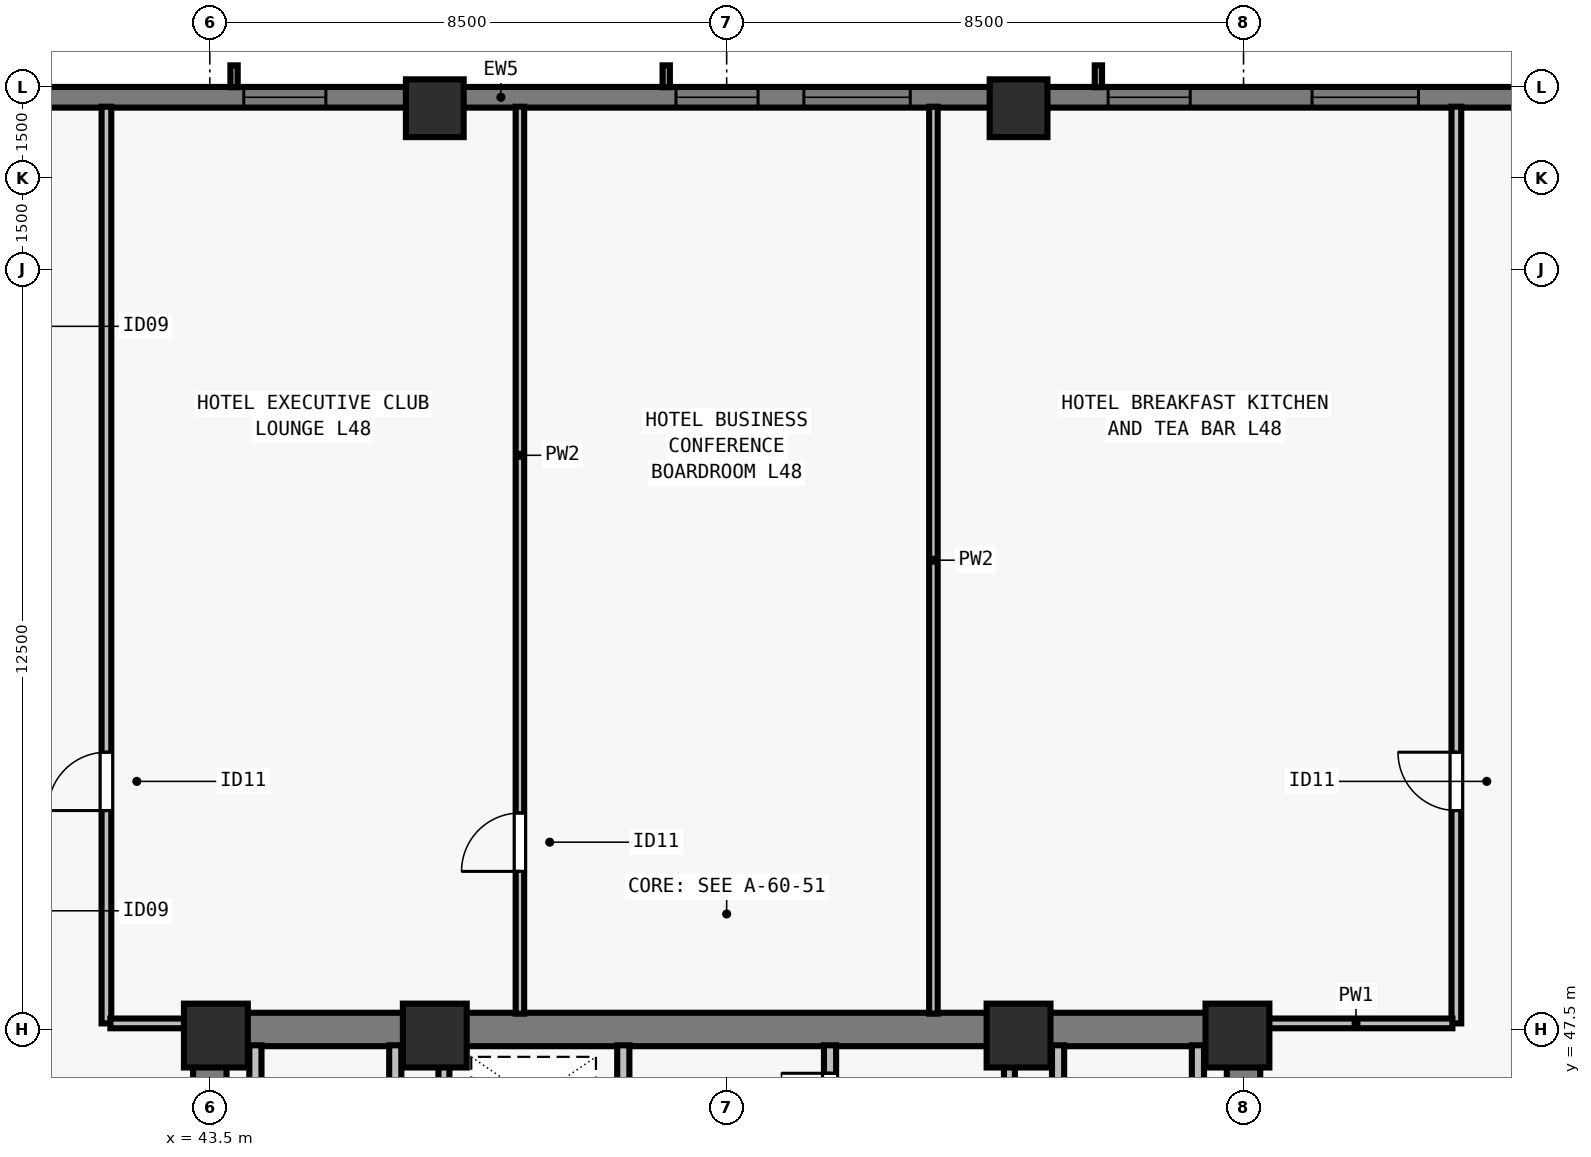
"""IFC4 building model, lengths in metres.
Left out: names, types, materials, properties, quantities, classifications, styles, units other than length and angle.
Written with IfcOpenShell. Run it as: python <this file> out.ifc"""

import sys

from ifc_helpers import new_model, si_unit, direction, frame, frame_2d, origin, origin_2d, place, context, subcontext, project, spatial, rectangle, extrude, element, fill, save


model = new_model("IFC4")
c1 = context("Model", 3, precision=1e-05, world=origin(), true_north=direction((0.0, 1.0)))
c2 = subcontext(c1, "Body", "Model", "MODEL_VIEW")
j1 = project(units=[si_unit("LENGTHUNIT", "METRE"), si_unit("PLANEANGLEUNIT", "RADIAN")], contexts=[c1])
p1 = place(None, origin())
s1 = spatial("IfcSite", under=j1, at=p1, CompositionType="ELEMENT")
p2 = place(p1, origin())
s2 = spatial("IfcBuilding", under=s1, at=p2, CompositionType="ELEMENT")
p3 = place(p2, frame((0.0, 0.0, 176.0)))
s3 = spatial("IfcBuildingStorey", under=s2, at=p3, CompositionType="ELEMENT", Elevation=176.0)
for number, where, z_axis, x_axis in (
    (1, (43.6, 47.4, 0.0), (0.0, 0.0, 1.0), (1.0, 0.0, 0.0)),
    (2, (47.2, 47.4, 0.0), (0.0, 0.0, 1.0), (1.0, 0.0, 0.0)),
    (3, (56.8, 47.4, 0.0), (0.0, 0.0, 1.0), (1.0, 0.0, 0.0)),
    (4, (60.4, 47.4, 0.0), (0.0, 0.0, 1.0), (1.0, 0.0, 0.0)),
):
    element("IfcColumn", number, at=place(p3, frame(where, z_axis=z_axis, x_axis=x_axis)), inside=s3, PredefinedType="COLUMN", context=c2, shape_type="SweptSolid", body=[
        extrude(rectangle(XDim=1.05, YDim=1.05, at=origin_2d()), origin(), (0.0, 0.0, 1.0), 3.5),
    ])
for number, where, z_axis, x_axis in (
    (5, (56.8, 62.65, 0.0), (0.0, 0.0, 1.0), (1.0, 0.0, 0.0)),
    (6, (47.2, 62.65, 0.0), (0.0, 0.0, 1.0), (1.0, 0.0, 0.0)),
):
    element("IfcColumn", number, at=place(p3, frame(where, z_axis=z_axis, x_axis=x_axis)), inside=s3, PredefinedType="COLUMN", context=c2, shape_type="SweptSolid", body=[
        extrude(rectangle(XDim=0.95, YDim=0.95, at=origin_2d()), origin(), (0.0, 0.0, 1.0), 3.5),
    ])
p4 = place(p3, frame((32.0, 62.83, 0.0), z_axis=(0.0, 0.0, 1.0), x_axis=(1.0, 0.0, 0.0)))
e7 = element("IfcWall", 7, at=p4, inside=s3, PredefinedType="SOLIDWALL", context=c2, shape_type="SweptSolid", body=[
    extrude(rectangle(XDim=39.682, YDim=0.34, at=frame_2d((19.841, 0.0))), origin(), (0.0, 0.0, 1.0), 3.28),
])
p5 = place(p4, frame((4.952, 0.0, 0.8)))
e8 = element("IfcOpeningElement", 8, at=p5, cuts=e7, PredefinedType="OPENING", context=c2, shape_type="SweptSolid", body=[
    extrude(rectangle(XDim=1.35, YDim=1.66, at=frame_2d((0.675, 0.83))), frame((0.0, 0.18, 0.0), z_axis=(0.0, -1.0, 0.0), x_axis=(1.0, 0.0, 0.0)), (0.0, 0.0, 1.0), 0.36),
])
p6 = place(p4, frame((12.059, 0.0, 0.8)))
e9 = element("IfcOpeningElement", 9, at=p6, cuts=e7, PredefinedType="OPENING", context=c2, shape_type="SweptSolid", body=[
    extrude(rectangle(XDim=1.35, YDim=1.66, at=frame_2d((0.675, 0.83))), frame((0.0, 0.18, 0.0), z_axis=(0.0, -1.0, 0.0), x_axis=(1.0, 0.0, 0.0)), (0.0, 0.0, 1.0), 0.36),
])
p7 = place(p4, frame((19.166, 0.0, 0.8)))
e10 = element("IfcOpeningElement", 10, at=p7, cuts=e7, PredefinedType="OPENING", context=c2, shape_type="SweptSolid", body=[
    extrude(rectangle(XDim=1.35, YDim=1.66, at=frame_2d((0.675, 0.83))), frame((0.0, 0.18, 0.0), z_axis=(0.0, -1.0, 0.0), x_axis=(1.0, 0.0, 0.0)), (0.0, 0.0, 1.0), 0.36),
])
p8 = place(p4, frame((21.27, 0.0, 0.8)))
e11 = element("IfcOpeningElement", 11, at=p8, cuts=e7, PredefinedType="OPENING", context=c2, shape_type="SweptSolid", body=[
    extrude(rectangle(XDim=1.75, YDim=1.66, at=frame_2d((0.875, 0.83))), frame((0.0, 0.18, 0.0), z_axis=(0.0, -1.0, 0.0), x_axis=(1.0, 0.0, 0.0)), (0.0, 0.0, 1.0), 0.36),
])
p9 = place(p4, frame((26.273, 0.0, 0.8)))
e12 = element("IfcOpeningElement", 12, at=p9, cuts=e7, PredefinedType="OPENING", context=c2, shape_type="SweptSolid", body=[
    extrude(rectangle(XDim=1.35, YDim=1.66, at=frame_2d((0.675, 0.83))), frame((0.0, 0.18, 0.0), z_axis=(0.0, -1.0, 0.0), x_axis=(1.0, 0.0, 0.0)), (0.0, 0.0, 1.0), 0.36),
])
p10 = place(p4, frame((29.627, 0.0, 0.8)))
e13 = element("IfcOpeningElement", 13, at=p10, cuts=e7, PredefinedType="OPENING", context=c2, shape_type="SweptSolid", body=[
    extrude(rectangle(XDim=1.75, YDim=1.66, at=frame_2d((0.875, 0.83))), frame((0.0, 0.18, 0.0), z_axis=(0.0, -1.0, 0.0), x_axis=(1.0, 0.0, 0.0)), (0.0, 0.0, 1.0), 0.36),
])
p11 = place(p4, frame((34.47, 0.0, 0.8)))
e14 = element("IfcOpeningElement", 14, at=p11, cuts=e7, PredefinedType="OPENING", context=c2, shape_type="SweptSolid", body=[
    extrude(rectangle(XDim=0.9, YDim=1.66, at=frame_2d((0.45, 0.83))), frame((0.0, 0.18, 0.0), z_axis=(0.0, -1.0, 0.0), x_axis=(1.0, 0.0, 0.0)), (0.0, 0.0, 1.0), 0.36),
])
p12 = place(p3, frame((43.225, 47.5, 0.0), z_axis=(0.0, 0.0, 1.0), x_axis=(1.0, 0.0, 0.0)))
e15 = element("IfcWall", 15, at=p12, inside=s3, PredefinedType="SHEAR", context=c2, shape_type="SweptSolid", body=[
    extrude(rectangle(XDim=17.55, YDim=0.55, at=frame_2d((8.775, 0.0))), origin(), (0.0, 0.0, 1.0), 3.28),
])
for number, where, z_axis, x_axis in (
    (16, (43.5, 40.8, 0.0), (0.0, 0.0, 1.0), (0.0, 1.0, 0.0)),
    (17, (60.5, 40.8, 0.0), (0.0, 0.0, 1.0), (0.0, 1.0, 0.0)),
):
    element("IfcWall", number, at=place(p3, frame(where, z_axis=z_axis, x_axis=x_axis)), inside=s3, PredefinedType="SHEAR", context=c2, shape_type="SweptSolid", body=[
        extrude(rectangle(XDim=6.435, YDim=0.55, at=frame_2d((3.218, 0.0))), origin(), (0.0, 0.0, 1.0), 3.28),
    ])
p13 = place(p3, frame((50.3, 40.585, 0.0), z_axis=(0.0, 0.0, 1.0), x_axis=(0.0, 1.0, 0.0)))
e18 = element("IfcWall", 18, at=p13, inside=s3, PredefinedType="SOLIDWALL", context=c2, shape_type="SweptSolid", body=[
    extrude(rectangle(XDim=6.655, YDim=0.2, at=frame_2d((3.328, 0.0))), origin(), (0.0, 0.0, 1.0), 3.28),
])
p14 = place(p13, frame((5.065, 0.0, 0.0)))
e19 = element("IfcOpeningElement", 19, at=p14, cuts=e18, PredefinedType="OPENING", context=c2, shape_type="SweptSolid", body=[
    extrude(rectangle(XDim=0.8, YDim=2.08, at=frame_2d((0.4, 1.04))), frame((0.0, 0.11, 0.0), z_axis=(0.0, -1.0, 0.0), x_axis=(1.0, 0.0, 0.0)), (0.0, 0.0, 1.0), 0.22),
])
p15 = place(p3, frame((53.7, 40.585, 0.0), z_axis=(0.0, 0.0, 1.0), x_axis=(0.0, 1.0, 0.0)))
e20 = element("IfcWall", 20, at=p15, inside=s3, PredefinedType="SOLIDWALL", context=c2, shape_type="SweptSolid", body=[
    extrude(rectangle(XDim=6.655, YDim=0.2, at=frame_2d((3.328, 0.0))), origin(), (0.0, 0.0, 1.0), 3.28),
])
p16 = place(p15, frame((0.195, 0.0, 0.0)))
e21 = element("IfcOpeningElement", 21, at=p16, cuts=e20, PredefinedType="OPENING", context=c2, shape_type="SweptSolid", body=[
    extrude(rectangle(XDim=0.8, YDim=2.08, at=frame_2d((0.4, 1.04))), frame((0.0, 0.11, 0.0), z_axis=(0.0, -1.0, 0.0), x_axis=(1.0, 0.0, 0.0)), (0.0, 0.0, 1.0), 0.22),
])
p17 = place(p15, frame((3.735, 0.0, 0.0)))
e22 = element("IfcOpeningElement", 22, at=p17, cuts=e20, PredefinedType="OPENING", context=c2, shape_type="SweptSolid", body=[
    extrude(rectangle(XDim=0.9, YDim=2.12, at=frame_2d((0.45, 1.06))), frame((0.0, 0.11, 0.0), z_axis=(0.0, -1.0, 0.0), x_axis=(1.0, 0.0, 0.0)), (0.0, 0.0, 1.0), 0.22),
])
p18 = place(p15, frame((5.395, 0.0, 0.0)))
e23 = element("IfcOpeningElement", 23, at=p18, cuts=e20, PredefinedType="OPENING", context=c2, shape_type="SweptSolid", body=[
    extrude(rectangle(XDim=0.8, YDim=2.1, at=frame_2d((0.4, 1.05))), frame((0.0, 0.11, 0.0), z_axis=(0.0, -1.0, 0.0), x_axis=(1.0, 0.0, 0.0)), (0.0, 0.0, 1.0), 0.22),
])
for number, where, z_axis, x_axis in (
    (24, (46.55, 43.735, 0.0), (0.0, 0.0, 1.0), (0.0, 1.0, 0.0)),
    (25, (44.25, 43.735, 0.0), (0.0, 0.0, 1.0), (0.0, 1.0, 0.0)),
    (26, (57.45, 43.735, 0.0), (0.0, 0.0, 1.0), (0.0, 1.0, 0.0)),
    (27, (59.75, 43.735, 0.0), (0.0, 0.0, 1.0), (0.0, 1.0, 0.0)),
):
    element("IfcWall", number, at=place(p3, frame(where, z_axis=z_axis, x_axis=x_axis)), inside=s3, PredefinedType="SOLIDWALL", context=c2, shape_type="SweptSolid", body=[
        extrude(rectangle(XDim=3.505, YDim=0.2, at=frame_2d((1.752, 0.0))), origin(), (0.0, 0.0, 1.0), 3.28),
    ])
for number, where, z_axis, x_axis in (
    (28, (47.35, 43.735, 0.0), (0.0, 0.0, 1.0), (0.0, 1.0, 0.0)),
    (29, (56.65, 43.735, 0.0), (0.0, 0.0, 1.0), (0.0, 1.0, 0.0)),
):
    element("IfcWall", number, at=place(p3, frame(where, z_axis=z_axis, x_axis=x_axis)), inside=s3, PredefinedType="SOLIDWALL", context=c2, shape_type="SweptSolid", body=[
        extrude(rectangle(XDim=3.505, YDim=0.18, at=frame_2d((1.752, 0.0))), origin(), (0.0, 0.0, 1.0), 3.28),
    ])
p19 = place(p3, frame((41.8, 47.6, 0.0), z_axis=(0.0, 0.0, 1.0), x_axis=(0.0, 1.0, 0.0)))
e30 = element("IfcWall", 30, at=p19, inside=s3, PredefinedType="PARTITIONING", context=c2, shape_type="SweptSolid", body=[
    extrude(rectangle(XDim=15.075, YDim=0.16, at=frame_2d((7.538, 0.0))), origin(), (0.0, 0.0, 1.0), 2.555),
])
p20 = place(p19, frame((3.5, 0.0, 0.0)))
e31 = element("IfcOpeningElement", 31, at=p20, cuts=e30, PredefinedType="OPENING", context=c2, shape_type="SweptSolid", body=[
    extrude(rectangle(XDim=0.96, YDim=2.12, at=frame_2d((0.48, 1.06))), frame((0.0, 0.09, 0.0), z_axis=(0.0, -1.0, 0.0), x_axis=(1.0, 0.0, 0.0)), (0.0, 0.0, 1.0), 0.18),
])
p21 = place(p3, frame((41.865, 47.6, 0.0), z_axis=(0.0, 0.0, 1.0), x_axis=(1.0, 0.0, 0.0)))
e32 = element("IfcWall", 32, at=p21, inside=s3, PredefinedType="PARTITIONING", context=c2, shape_type="SweptSolid", body=[
    extrude(rectangle(XDim=1.37, YDim=0.16, at=frame_2d((0.685, 0.0))), origin(), (0.0, 0.0, 1.0), 3.28),
])
p22 = place(p3, frame((64.0, 47.6, 0.0), z_axis=(0.0, 0.0, 1.0), x_axis=(0.0, 1.0, 0.0)))
e33 = element("IfcWall", 33, at=p22, inside=s3, PredefinedType="PARTITIONING", context=c2, shape_type="SweptSolid", body=[
    extrude(rectangle(XDim=15.075, YDim=0.16, at=frame_2d((7.538, 0.0))), origin(), (0.0, 0.0, 1.0), 2.555),
])
p23 = place(p22, frame((3.5, 0.0, 0.0)))
e34 = element("IfcOpeningElement", 34, at=p23, cuts=e33, PredefinedType="OPENING", context=c2, shape_type="SweptSolid", body=[
    extrude(rectangle(XDim=0.96, YDim=2.12, at=frame_2d((0.48, 1.06))), frame((0.0, 0.09, 0.0), z_axis=(0.0, -1.0, 0.0), x_axis=(1.0, 0.0, 0.0)), (0.0, 0.0, 1.0), 0.18),
])
p24 = place(p3, frame((60.765, 47.6, 0.0), z_axis=(0.0, 0.0, 1.0), x_axis=(1.0, 0.0, 0.0)))
e35 = element("IfcWall", 35, at=p24, inside=s3, PredefinedType="PARTITIONING", context=c2, shape_type="SweptSolid", body=[
    extrude(rectangle(XDim=3.17, YDim=0.16, at=frame_2d((1.585, 0.0))), origin(), (0.0, 0.0, 1.0), 3.28),
])
p25 = place(p3, frame((48.6, 47.76, 0.0), z_axis=(0.0, 0.0, 1.0), x_axis=(0.0, 1.0, 0.0)))
e36 = element("IfcWall", 36, at=p25, inside=s3, PredefinedType="PARTITIONING", context=c2, shape_type="SweptSolid", body=[
    extrude(rectangle(XDim=14.915, YDim=0.14, at=frame_2d((7.458, 0.0))), origin(), (0.0, 0.0, 1.0), 2.896),
])
p26 = place(p25, frame((2.34, 0.0, 0.0)))
e37 = element("IfcOpeningElement", 37, at=p26, cuts=e36, PredefinedType="OPENING", context=c2, shape_type="SweptSolid", body=[
    extrude(rectangle(XDim=0.96, YDim=2.12, at=frame_2d((0.48, 1.06))), frame((0.0, 0.08, 0.0), z_axis=(0.0, -1.0, 0.0), x_axis=(1.0, 0.0, 0.0)), (0.0, 0.0, 1.0), 0.16),
])
p27 = place(p3, frame((55.4, 47.76, 0.0), z_axis=(0.0, 0.0, 1.0), x_axis=(0.0, 1.0, 0.0)))
e38 = element("IfcWall", 38, at=p27, inside=s3, PredefinedType="PARTITIONING", context=c2, shape_type="SweptSolid", body=[
    extrude(rectangle(XDim=14.915, YDim=0.14, at=frame_2d((7.458, 0.0))), origin(), (0.0, 0.0, 1.0), 2.896),
])
p28 = place(p6, origin())
e39 = element("IfcWindow", 39, at=p28, inside=s3, PartitioningType="SINGLE_PANEL", PredefinedType="WINDOW", context=c2, shape_type="SweptSolid", body=[
    extrude(rectangle(XDim=1.35, YDim=1.66, at=frame_2d((0.675, 0.83))), frame((0.0, -0.05, 0.0), z_axis=(0.0, -1.0, 0.0), x_axis=(1.0, 0.0, 0.0)), (0.0, 0.0, 1.0), 0.06),
])
fill(e9, e39)
p29 = place(p7, origin())
e40 = element("IfcWindow", 40, at=p29, inside=s3, PartitioningType="SINGLE_PANEL", PredefinedType="WINDOW", context=c2, shape_type="SweptSolid", body=[
    extrude(rectangle(XDim=1.35, YDim=1.66, at=frame_2d((0.675, 0.83))), frame((0.0, -0.05, 0.0), z_axis=(0.0, -1.0, 0.0), x_axis=(1.0, 0.0, 0.0)), (0.0, 0.0, 1.0), 0.06),
])
fill(e10, e40)
p30 = place(p8, origin())
e41 = element("IfcWindow", 41, at=p30, inside=s3, PartitioningType="SINGLE_PANEL", PredefinedType="WINDOW", context=c2, shape_type="SweptSolid", body=[
    extrude(rectangle(XDim=1.75, YDim=1.66, at=frame_2d((0.875, 0.83))), frame((0.0, -0.05, 0.0), z_axis=(0.0, -1.0, 0.0), x_axis=(1.0, 0.0, 0.0)), (0.0, 0.0, 1.0), 0.06),
])
fill(e11, e41)
p31 = place(p9, origin())
e42 = element("IfcWindow", 42, at=p31, inside=s3, PartitioningType="SINGLE_PANEL", PredefinedType="WINDOW", context=c2, shape_type="SweptSolid", body=[
    extrude(rectangle(XDim=1.35, YDim=1.66, at=frame_2d((0.675, 0.83))), frame((0.0, -0.05, 0.0), z_axis=(0.0, -1.0, 0.0), x_axis=(1.0, 0.0, 0.0)), (0.0, 0.0, 1.0), 0.06),
])
fill(e12, e42)
p32 = place(p10, origin())
e43 = element("IfcWindow", 43, at=p32, inside=s3, PartitioningType="SINGLE_PANEL", PredefinedType="WINDOW", context=c2, shape_type="SweptSolid", body=[
    extrude(rectangle(XDim=1.75, YDim=1.66, at=frame_2d((0.875, 0.83))), frame((0.0, -0.05, 0.0), z_axis=(0.0, -1.0, 0.0), x_axis=(1.0, 0.0, 0.0)), (0.0, 0.0, 1.0), 0.06),
])
fill(e13, e43)
p33 = place(p18, origin())
e44 = element("IfcDoor", 44, at=p33, inside=s3, OperationType="SINGLE_SWING_RIGHT", PredefinedType="DOOR", context=c2, shape_type="SweptSolid", body=[
    extrude(rectangle(XDim=0.8, YDim=2.1, at=frame_2d((0.4, 1.05))), frame((0.0, 0.025, 0.0), z_axis=(0.0, -1.0, 0.0), x_axis=(1.0, 0.0, 0.0)), (0.0, 0.0, 1.0), 0.05),
])
fill(e23, e44)
p34 = place(p20, origin())
e45 = element("IfcDoor", 45, at=p34, inside=s3, OperationType="SINGLE_SWING_LEFT", PredefinedType="DOOR", context=c2, shape_type="SweptSolid", body=[
    extrude(rectangle(XDim=0.96, YDim=2.12, at=frame_2d((0.48, 1.06))), frame((0.0, 0.025, 0.0), z_axis=(0.0, -1.0, 0.0), x_axis=(1.0, 0.0, 0.0)), (0.0, 0.0, 1.0), 0.05),
])
fill(e31, e45)
p35 = place(p23, origin())
e46 = element("IfcDoor", 46, at=p35, inside=s3, OperationType="SINGLE_SWING_RIGHT", PredefinedType="DOOR", context=c2, shape_type="SweptSolid", body=[
    extrude(rectangle(XDim=0.96, YDim=2.12, at=frame_2d((0.48, 1.06))), frame((0.0, 0.025, 0.0), z_axis=(0.0, -1.0, 0.0), x_axis=(1.0, 0.0, 0.0)), (0.0, 0.0, 1.0), 0.05),
])
fill(e34, e46)
p36 = place(p26, origin())
e47 = element("IfcDoor", 47, at=p36, inside=s3, OperationType="SINGLE_SWING_LEFT", PredefinedType="DOOR", context=c2, shape_type="SweptSolid", body=[
    extrude(rectangle(XDim=0.96, YDim=2.12, at=frame_2d((0.48, 1.06))), frame((0.0, 0.025, 0.0), z_axis=(0.0, -1.0, 0.0), x_axis=(1.0, 0.0, 0.0)), (0.0, 0.0, 1.0), 0.05),
])
fill(e37, e47)
save(model, sys.argv[1])
